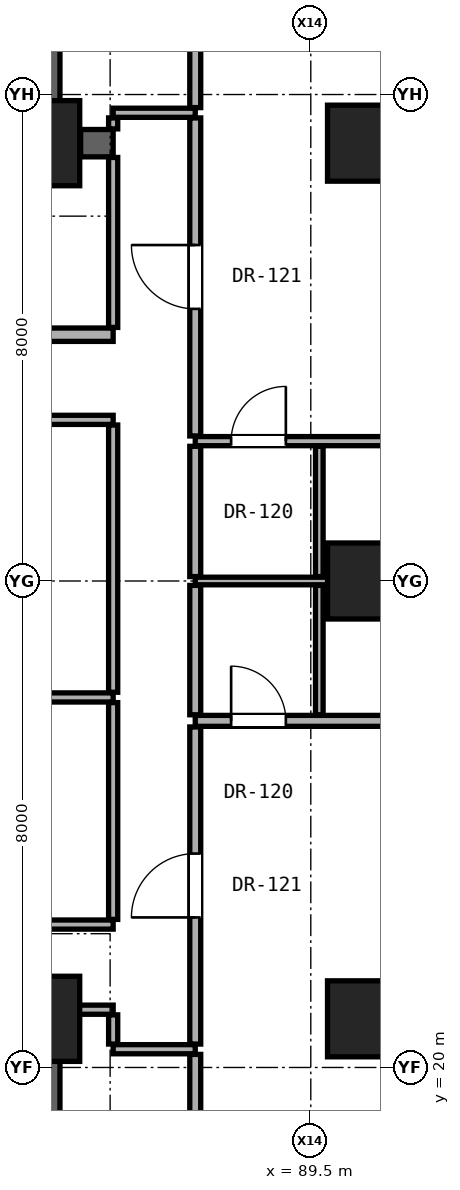
"""IFC4 building model, lengths in metres.
Left out: names, types, materials, properties, quantities, classifications, styles, units other than length and angle.
Written with IfcOpenShell. Run it as: python <this file> out.ifc"""

import sys

from ifc_helpers import new_model, si_unit, direction, frame, frame_2d, origin, origin_2d, place, context, subcontext, project, spatial, rectangle, hollow_rectangle, extrude, element, fill, save


model = new_model("IFC4")
c1 = context("Model", 3, precision=1e-05, world=origin(), true_north=direction((0.0, 1.0)))
c2 = subcontext(c1, "Body", "Model", "MODEL_VIEW")
j1 = project(units=[si_unit("LENGTHUNIT", "METRE"), si_unit("PLANEANGLEUNIT", "RADIAN")], contexts=[c1])
p1 = place(None, origin())
s1 = spatial("IfcSite", under=j1, at=p1, CompositionType="ELEMENT")
p2 = place(p1, origin())
s2 = spatial("IfcBuilding", under=s1, at=p2, CompositionType="ELEMENT")
p3 = place(p2, frame((0.0, 0.0, 45.5)))
s3 = spatial("IfcBuildingStorey", under=s2, at=p3, CompositionType="ELEMENT", Elevation=45.5)
for number, where, z_axis, x_axis in (
    (1, (85.0, 20.8, 0.0), (0.0, 0.0, 1.0), (1.0, 0.0, 0.0)),
    (2, (85.0, 35.2, 0.0), (0.0, 0.0, 1.0), (1.0, 0.0, 0.0)),
):
    element("IfcColumn", number, at=place(p3, frame(where, z_axis=z_axis, x_axis=x_axis)), inside=s3, PredefinedType="COLUMN", context=c2, shape_type="SweptSolid", body=[
        extrude(rectangle(XDim=1.4, YDim=1.4, at=origin_2d()), origin(), (0.0, 0.0, 1.0), 3.3),
    ])
for number, where, z_axis, x_axis in (
    (3, (90.4, 20.8, 0.0), (0.0, 0.0, 1.0), (1.0, 0.0, 0.0)),
    (4, (90.4, 28.0, 0.0), (0.0, 0.0, 1.0), (1.0, 0.0, 0.0)),
    (5, (90.4, 35.2, 0.0), (0.0, 0.0, 1.0), (1.0, 0.0, 0.0)),
):
    element("IfcColumn", number, at=place(p3, frame(where, z_axis=z_axis, x_axis=x_axis)), inside=s3, PredefinedType="COLUMN", context=c2, shape_type="SweptSolid", body=[
        extrude(hollow_rectangle(XDim=1.25, YDim=1.25, WallThickness=0.07, at=origin_2d()), origin(), (0.0, 0.0, 1.0), 3.3),
    ])
for number, where, z_axis, x_axis in (
    (6, (85.0, 35.2, 0.0), (0.0, 0.0, 1.0), (0.0, 1.0, 0.0)),
    (7, (85.0, 15.2, 0.0), (0.0, 0.0, 1.0), (0.0, 1.0, 0.0)),
):
    element("IfcWall", number, at=place(p3, frame(where, z_axis=z_axis, x_axis=x_axis)), inside=s3, PredefinedType="SHEAR", context=c2, shape_type="SweptSolid", body=[
        extrude(rectangle(XDim=5.6, YDim=0.75, at=frame_2d((2.8, 0.0))), origin(), (0.0, 0.0, 1.0), 3.06),
    ])
p4 = place(p3, frame((86.25, 20.3, 0.0), z_axis=(0.0, 0.0, 1.0), x_axis=(1.0, 0.0, 0.0)))
e8 = element("IfcWall", 8, at=p4, inside=s3, PredefinedType="PARTITIONING", context=c2, shape_type="SweptSolid", body=[
    extrude(rectangle(XDim=1.35, YDim=0.15, at=frame_2d((0.675, 0.0))), origin(), (0.0, 0.0, 1.0), 3.06),
])
p5 = place(p3, frame((85.37, 20.95, 0.0), z_axis=(0.0, 0.0, 1.0), x_axis=(1.0, 0.0, 0.0)))
e9 = element("IfcWall", 9, at=p5, inside=s3, PredefinedType="PARTITIONING", context=c2, shape_type="SweptSolid", body=[
    extrude(rectangle(XDim=0.88, YDim=0.15, at=frame_2d((0.44, 0.0))), origin(), (0.0, 0.0, 1.0), 2.452),
])
p6 = place(p3, frame((66.62, 22.35, 0.0), z_axis=(0.0, 0.0, 1.0), x_axis=(1.0, 0.0, 0.0)))
e10 = element("IfcWall", 10, at=p6, inside=s3, PredefinedType="PARTITIONING", context=c2, shape_type="SweptSolid", body=[
    extrude(rectangle(XDim=19.63, YDim=0.15, at=frame_2d((9.815, 0.0))), origin(), (0.0, 0.0, 1.0), 2.125),
])
p7 = place(p6, frame((8.981, 0.0, 0.0)))
e11 = element("IfcOpeningElement", 11, at=p7, cuts=e10, PredefinedType="OPENING", context=c2, shape_type="SweptSolid", body=[
    extrude(rectangle(XDim=0.85, YDim=2.01, at=frame_2d((0.425, 1.005))), frame((0.0, 0.085, 0.0), z_axis=(0.0, -1.0, 0.0), x_axis=(1.0, 0.0, 0.0)), (0.0, 0.0, 1.0), 0.17),
])
p8 = place(p6, frame((16.061, 0.0, 0.0)))
e12 = element("IfcOpeningElement", 12, at=p8, cuts=e10, PredefinedType="OPENING", context=c2, shape_type="SweptSolid", body=[
    extrude(rectangle(XDim=0.85, YDim=2.01, at=frame_2d((0.425, 1.005))), frame((0.0, 0.085, 0.0), z_axis=(0.0, -1.0, 0.0), x_axis=(1.0, 0.0, 0.0)), (0.0, 0.0, 1.0), 0.17),
])
p9 = place(p3, frame((87.6, 25.7, 0.0), z_axis=(0.0, 0.0, 1.0), x_axis=(1.0, 0.0, 0.0)))
e13 = element("IfcWall", 13, at=p9, inside=s3, PredefinedType="PARTITIONING", context=c2, shape_type="SweptSolid", body=[
    extrude(rectangle(XDim=8.346, YDim=0.18, at=frame_2d((4.173, 0.0))), origin(), (0.0, 0.0, 1.0), 2.196),
])
p10 = place(p9, frame((4.698, 0.0, 0.0)))
e14 = element("IfcOpeningElement", 14, at=p10, cuts=e13, PredefinedType="OPENING", context=c2, shape_type="SweptSolid", body=[
    extrude(rectangle(XDim=0.95, YDim=2.15, at=frame_2d((0.475, 1.075))), frame((0.0, 0.1, 0.0), z_axis=(0.0, -1.0, 0.0), x_axis=(1.0, 0.0, 0.0)), (0.0, 0.0, 1.0), 0.2),
])
p11 = place(p9, frame((0.59, 0.0, 0.0)))
e15 = element("IfcOpeningElement", 15, at=p11, cuts=e13, PredefinedType="OPENING", context=c2, shape_type="SweptSolid", body=[
    extrude(rectangle(XDim=0.9, YDim=2.1, at=frame_2d((0.45, 1.05))), frame((0.0, 0.1, 0.0), z_axis=(0.0, -1.0, 0.0), x_axis=(1.0, 0.0, 0.0)), (0.0, 0.0, 1.0), 0.2),
])
p12 = place(p3, frame((72.05, 26.085, 0.0), z_axis=(0.0, 0.0, 1.0), x_axis=(1.0, 0.0, 0.0)))
e16 = element("IfcWall", 16, at=p12, inside=s3, PredefinedType="PARTITIONING", context=c2, shape_type="SweptSolid", body=[
    extrude(rectangle(XDim=14.2, YDim=0.15, at=frame_2d((7.1, 0.0))), origin(), (0.0, 0.0, 1.0), 2.125),
])
p13 = place(p3, frame((87.6, 28.0, 0.0), z_axis=(0.0, 0.0, 1.0), x_axis=(1.0, 0.0, 0.0)))
e17 = element("IfcWall", 17, at=p13, inside=s3, PredefinedType="PARTITIONING", context=c2, shape_type="SweptSolid", body=[
    extrude(rectangle(XDim=8.346, YDim=0.125, at=frame_2d((4.173, 0.0))), origin(), (0.0, 0.0, 1.0), 2.196),
])
p14 = place(p3, frame((87.6, 30.3, 0.0), z_axis=(0.0, 0.0, 1.0), x_axis=(1.0, 0.0, 0.0)))
e18 = element("IfcWall", 18, at=p14, inside=s3, PredefinedType="PARTITIONING", context=c2, shape_type="SweptSolid", body=[
    extrude(rectangle(XDim=8.346, YDim=0.15, at=frame_2d((4.173, 0.0))), origin(), (0.0, 0.0, 1.0), 2.196),
])
p15 = place(p14, frame((4.698, 0.0, 0.0)))
e19 = element("IfcOpeningElement", 19, at=p15, cuts=e18, PredefinedType="OPENING", context=c2, shape_type="SweptSolid", body=[
    extrude(rectangle(XDim=0.95, YDim=2.15, at=frame_2d((0.475, 1.075))), frame((0.0, 0.085, 0.0), z_axis=(0.0, -1.0, 0.0), x_axis=(1.0, 0.0, 0.0)), (0.0, 0.0, 1.0), 0.17),
])
p16 = place(p14, frame((0.59, 0.0, 0.0)))
e20 = element("IfcOpeningElement", 20, at=p16, cuts=e18, PredefinedType="OPENING", context=c2, shape_type="SweptSolid", body=[
    extrude(rectangle(XDim=0.9, YDim=2.1, at=frame_2d((0.45, 1.05))), frame((0.0, 0.085, 0.0), z_axis=(0.0, -1.0, 0.0), x_axis=(1.0, 0.0, 0.0)), (0.0, 0.0, 1.0), 0.17),
])
p17 = place(p3, frame((66.62, 30.65, 0.0), z_axis=(0.0, 0.0, 1.0), x_axis=(1.0, 0.0, 0.0)))
e21 = element("IfcWall", 21, at=p17, inside=s3, PredefinedType="PARTITIONING", context=c2, shape_type="SweptSolid", body=[
    extrude(rectangle(XDim=19.63, YDim=0.15, at=frame_2d((9.815, 0.0))), origin(), (0.0, 0.0, 1.0), 2.125),
])
p18 = place(p17, frame((3.855, 0.0, 0.0)))
e22 = element("IfcOpeningElement", 22, at=p18, cuts=e21, PredefinedType="OPENING", context=c2, shape_type="SweptSolid", body=[
    extrude(rectangle(XDim=0.85, YDim=2.01, at=frame_2d((0.425, 1.005))), frame((0.0, 0.085, 0.0), z_axis=(0.0, -1.0, 0.0), x_axis=(1.0, 0.0, 0.0)), (0.0, 0.0, 1.0), 0.17),
])
p19 = place(p17, frame((8.981, 0.0, 0.0)))
e23 = element("IfcOpeningElement", 23, at=p19, cuts=e21, PredefinedType="OPENING", context=c2, shape_type="SweptSolid", body=[
    extrude(rectangle(XDim=0.85, YDim=2.01, at=frame_2d((0.425, 1.005))), frame((0.0, 0.085, 0.0), z_axis=(0.0, -1.0, 0.0), x_axis=(1.0, 0.0, 0.0)), (0.0, 0.0, 1.0), 0.17),
])
p20 = place(p17, frame((16.061, 0.0, 0.0)))
e24 = element("IfcOpeningElement", 24, at=p20, cuts=e21, PredefinedType="OPENING", context=c2, shape_type="SweptSolid", body=[
    extrude(rectangle(XDim=0.85, YDim=2.01, at=frame_2d((0.425, 1.005))), frame((0.0, 0.085, 0.0), z_axis=(0.0, -1.0, 0.0), x_axis=(1.0, 0.0, 0.0)), (0.0, 0.0, 1.0), 0.17),
])
p21 = place(p3, frame((71.55, 32.05, 0.0), z_axis=(0.0, 0.0, 1.0), x_axis=(1.0, 0.0, 0.0)))
e25 = element("IfcWall", 25, at=p21, inside=s3, PredefinedType="SOLIDWALL", context=c2, shape_type="SweptSolid", body=[
    extrude(rectangle(XDim=14.7, YDim=0.22, at=frame_2d((7.35, 0.0))), origin(), (0.0, 0.0, 1.0), 2.125),
])
p22 = place(p21, frame((11.39, 0.0, 0.0)))
e26 = element("IfcOpeningElement", 26, at=p22, cuts=e25, PredefinedType="OPENING", context=c2, shape_type="SweptSolid", body=[
    extrude(rectangle(XDim=0.85, YDim=2.01, at=frame_2d((0.425, 1.005))), frame((0.0, 0.12, 0.0), z_axis=(0.0, -1.0, 0.0), x_axis=(1.0, 0.0, 0.0)), (0.0, 0.0, 1.0), 0.24),
])
p23 = place(p21, frame((6.065, 0.0, 0.0)))
e27 = element("IfcOpeningElement", 27, at=p23, cuts=e25, PredefinedType="OPENING", context=c2, shape_type="SweptSolid", body=[
    extrude(rectangle(XDim=0.85, YDim=2.01, at=frame_2d((0.425, 1.005))), frame((0.0, 0.12, 0.0), z_axis=(0.0, -1.0, 0.0), x_axis=(1.0, 0.0, 0.0)), (0.0, 0.0, 1.0), 0.24),
])
p24 = place(p21, frame((0.7, 0.0, 0.0)))
e28 = element("IfcOpeningElement", 28, at=p24, cuts=e25, PredefinedType="OPENING", context=c2, shape_type="SweptSolid", body=[
    extrude(rectangle(XDim=0.85, YDim=2.01, at=frame_2d((0.425, 1.005))), frame((0.0, 0.12, 0.0), z_axis=(0.0, -1.0, 0.0), x_axis=(1.0, 0.0, 0.0)), (0.0, 0.0, 1.0), 0.24),
])
p25 = place(p21, frame((2.55, 0.0, 0.0)))
e29 = element("IfcOpeningElement", 29, at=p25, cuts=e25, PredefinedType="OPENING", context=c2, shape_type="SweptSolid", body=[
    extrude(rectangle(XDim=0.85, YDim=2.01, at=frame_2d((0.425, 1.005))), frame((0.0, 0.12, 0.0), z_axis=(0.0, -1.0, 0.0), x_axis=(1.0, 0.0, 0.0)), (0.0, 0.0, 1.0), 0.24),
])
p26 = place(p3, frame((85.715, 35.2, 0.0), z_axis=(0.0, 0.0, 1.0), x_axis=(1.0, 0.0, 0.0)))
e30 = element("IfcWall", 30, at=p26, inside=s3, PredefinedType="SHEAR", context=c2, shape_type="SweptSolid", body=[
    extrude(rectangle(XDim=0.535, YDim=0.45, at=frame_2d((0.268, 0.0))), origin(), (0.0, 0.0, 1.0), 3.06),
])
p27 = place(p3, frame((86.25, 35.7, 0.0), z_axis=(0.0, 0.0, 1.0), x_axis=(1.0, 0.0, 0.0)))
e31 = element("IfcWall", 31, at=p27, inside=s3, PredefinedType="PARTITIONING", context=c2, shape_type="SweptSolid", body=[
    extrude(rectangle(XDim=1.35, YDim=0.15, at=frame_2d((0.675, 0.0))), origin(), (0.0, 0.0, 1.0), 3.06),
])
p28 = place(p3, frame((86.25, 20.385, 0.0), z_axis=(0.0, 0.0, 1.0), x_axis=(0.0, 1.0, 0.0)))
e32 = element("IfcWall", 32, at=p28, inside=s3, PredefinedType="PARTITIONING", context=c2, shape_type="SweptSolid", body=[
    extrude(rectangle(XDim=0.48, YDim=0.15, at=frame_2d((0.24, 0.0))), origin(), (0.0, 0.0, 1.0), 2.452),
])
p29 = place(p3, frame((86.25, 22.435, 0.0), z_axis=(0.0, 0.0, 1.0), x_axis=(0.0, 1.0, 0.0)))
e33 = element("IfcWall", 33, at=p29, inside=s3, PredefinedType="PARTITIONING", context=c2, shape_type="SweptSolid", body=[
    extrude(rectangle(XDim=3.565, YDim=0.15, at=frame_2d((1.782, 0.0))), origin(), (0.0, 0.0, 1.0), 3.06),
])
p30 = place(p3, frame((86.25, 26.17, 0.0), z_axis=(0.0, 0.0, 1.0), x_axis=(0.0, 1.0, 0.0)))
e34 = element("IfcWall", 34, at=p30, inside=s3, PredefinedType="PARTITIONING", context=c2, shape_type="SweptSolid", body=[
    extrude(rectangle(XDim=4.395, YDim=0.15, at=frame_2d((2.198, 0.0))), origin(), (0.0, 0.0, 1.0), 2.279),
])
p31 = place(p3, frame((86.25, 32.17, 0.0), z_axis=(0.0, 0.0, 1.0), x_axis=(0.0, 1.0, 0.0)))
e35 = element("IfcWall", 35, at=p31, inside=s3, PredefinedType="PARTITIONING", context=c2, shape_type="SweptSolid", body=[
    extrude(rectangle(XDim=2.795, YDim=0.15, at=frame_2d((1.397, 0.0))), origin(), (0.0, 0.0, 1.0), 2.452),
])
p32 = place(p3, frame((86.25, 35.435, 0.0), z_axis=(0.0, 0.0, 1.0), x_axis=(0.0, 1.0, 0.0)))
e36 = element("IfcWall", 36, at=p32, inside=s3, PredefinedType="PARTITIONING", context=c2, shape_type="SweptSolid", body=[
    extrude(rectangle(XDim=0.18, YDim=0.15, at=frame_2d((0.09, 0.0))), origin(), (0.0, 0.0, 1.0), 2.452),
])
p33 = place(p3, frame((87.6, 16.117, 0.0), z_axis=(0.0, 0.0, 1.0), x_axis=(0.0, 1.0, 0.0)))
e37 = element("IfcWall", 37, at=p33, inside=s3, PredefinedType="PARTITIONING", context=c2, shape_type="SweptSolid", body=[
    extrude(rectangle(XDim=4.098, YDim=0.18, at=frame_2d((2.049, 0.0))), origin(), (0.0, 0.0, 1.0), 2.436),
])
p34 = place(p3, frame((87.6, 20.385, 0.0), z_axis=(0.0, 0.0, 1.0), x_axis=(0.0, 1.0, 0.0)))
e38 = element("IfcWall", 38, at=p34, inside=s3, PredefinedType="PARTITIONING", context=c2, shape_type="SweptSolid", body=[
    extrude(rectangle(XDim=5.215, YDim=0.18, at=frame_2d((2.607, 0.0))), origin(), (0.0, 0.0, 1.0), 2.452),
])
p35 = place(p34, frame((2.083, 0.0, 0.0)))
e39 = element("IfcOpeningElement", 39, at=p35, cuts=e38, PredefinedType="OPENING", context=c2, shape_type="SweptSolid", body=[
    extrude(rectangle(XDim=1.05, YDim=2.2, at=frame_2d((0.525, 1.1))), frame((0.0, 0.1, 0.0), z_axis=(0.0, -1.0, 0.0), x_axis=(1.0, 0.0, 0.0)), (0.0, 0.0, 1.0), 0.2),
])
p36 = place(p3, frame((87.6, 25.8, 0.0), z_axis=(0.0, 0.0, 1.0), x_axis=(0.0, 1.0, 0.0)))
e40 = element("IfcWall", 40, at=p36, inside=s3, PredefinedType="PARTITIONING", context=c2, shape_type="SweptSolid", body=[
    extrude(rectangle(XDim=2.127, YDim=0.18, at=frame_2d((1.064, 0.0))), origin(), (0.0, 0.0, 1.0), 2.279),
])
p37 = place(p3, frame((87.6, 28.073, 0.0), z_axis=(0.0, 0.0, 1.0), x_axis=(0.0, 1.0, 0.0)))
e41 = element("IfcWall", 41, at=p37, inside=s3, PredefinedType="PARTITIONING", context=c2, shape_type="SweptSolid", body=[
    extrude(rectangle(XDim=2.143, YDim=0.18, at=frame_2d((1.071, 0.0))), origin(), (0.0, 0.0, 1.0), 2.279),
])
p38 = place(p3, frame((87.6, 30.385, 0.0), z_axis=(0.0, 0.0, 1.0), x_axis=(0.0, 1.0, 0.0)))
e42 = element("IfcWall", 42, at=p38, inside=s3, PredefinedType="PARTITIONING", context=c2, shape_type="SweptSolid", body=[
    extrude(rectangle(XDim=5.23, YDim=0.18, at=frame_2d((2.615, 0.0))), origin(), (0.0, 0.0, 1.0), 2.452),
])
p39 = place(p38, frame((2.09, 0.0, 0.0)))
e43 = element("IfcOpeningElement", 43, at=p39, cuts=e42, PredefinedType="OPENING", context=c2, shape_type="SweptSolid", body=[
    extrude(rectangle(XDim=1.05, YDim=2.2, at=frame_2d((0.525, 1.1))), frame((0.0, 0.1, 0.0), z_axis=(0.0, -1.0, 0.0), x_axis=(1.0, 0.0, 0.0)), (0.0, 0.0, 1.0), 0.2),
])
p40 = place(p3, frame((87.6, 35.785, 0.0), z_axis=(0.0, 0.0, 1.0), x_axis=(0.0, 1.0, 0.0)))
e44 = element("IfcWall", 44, at=p40, inside=s3, PredefinedType="PARTITIONING", context=c2, shape_type="SweptSolid", body=[
    extrude(rectangle(XDim=4.113, YDim=0.18, at=frame_2d((2.057, 0.0))), origin(), (0.0, 0.0, 1.0), 2.436),
])
p41 = place(p3, frame((89.64, 25.8, 0.0), z_axis=(0.0, 0.0, 1.0), x_axis=(0.0, 1.0, 0.0)))
e45 = element("IfcWall", 45, at=p41, inside=s3, PredefinedType="PARTITIONING", context=c2, shape_type="SweptSolid", body=[
    extrude(rectangle(XDim=2.127, YDim=0.125, at=frame_2d((1.064, 0.0))), origin(), (0.0, 0.0, 1.0), 2.279),
])
p42 = place(p3, frame((89.64, 28.073, 0.0), z_axis=(0.0, 0.0, 1.0), x_axis=(0.0, 1.0, 0.0)))
e46 = element("IfcWall", 46, at=p42, inside=s3, PredefinedType="PARTITIONING", context=c2, shape_type="SweptSolid", body=[
    extrude(rectangle(XDim=2.143, YDim=0.125, at=frame_2d((1.071, 0.0))), origin(), (0.0, 0.0, 1.0), 2.279),
])
p43 = place(p35, origin())
e47 = element("IfcDoor", 47, at=p43, inside=s3, OperationType="SINGLE_SWING_LEFT", PredefinedType="DOOR", context=c2, shape_type="SweptSolid", body=[
    extrude(rectangle(XDim=1.05, YDim=2.2, at=frame_2d((0.525, 1.1))), frame((0.0, 0.025, 0.0), z_axis=(0.0, -1.0, 0.0), x_axis=(1.0, 0.0, 0.0)), (0.0, 0.0, 1.0), 0.05),
])
fill(e39, e47)
p44 = place(p11, origin())
e48 = element("IfcDoor", 48, at=p44, inside=s3, OperationType="SINGLE_SWING_LEFT", PredefinedType="DOOR", context=c2, shape_type="SweptSolid", body=[
    extrude(rectangle(XDim=0.9, YDim=2.1, at=frame_2d((0.45, 1.05))), frame((0.0, 0.025, 0.0), z_axis=(0.0, -1.0, 0.0), x_axis=(1.0, 0.0, 0.0)), (0.0, 0.0, 1.0), 0.05),
])
fill(e15, e48)
p45 = place(p39, origin())
e49 = element("IfcDoor", 49, at=p45, inside=s3, OperationType="SINGLE_SWING_RIGHT", PredefinedType="DOOR", context=c2, shape_type="SweptSolid", body=[
    extrude(rectangle(XDim=1.05, YDim=2.2, at=frame_2d((0.525, 1.1))), frame((0.0, 0.025, 0.0), z_axis=(0.0, -1.0, 0.0), x_axis=(1.0, 0.0, 0.0)), (0.0, 0.0, 1.0), 0.05),
])
fill(e43, e49)
p46 = place(p16, origin())
e50 = element("IfcDoor", 50, at=p46, inside=s3, OperationType="SINGLE_SWING_RIGHT", PredefinedType="DOOR", context=c2, shape_type="SweptSolid", body=[
    extrude(rectangle(XDim=0.9, YDim=2.1, at=frame_2d((0.45, 1.05))), frame((0.0, 0.025, 0.0), z_axis=(0.0, -1.0, 0.0), x_axis=(1.0, 0.0, 0.0)), (0.0, 0.0, 1.0), 0.05),
])
fill(e20, e50)
save(model, sys.argv[1])
